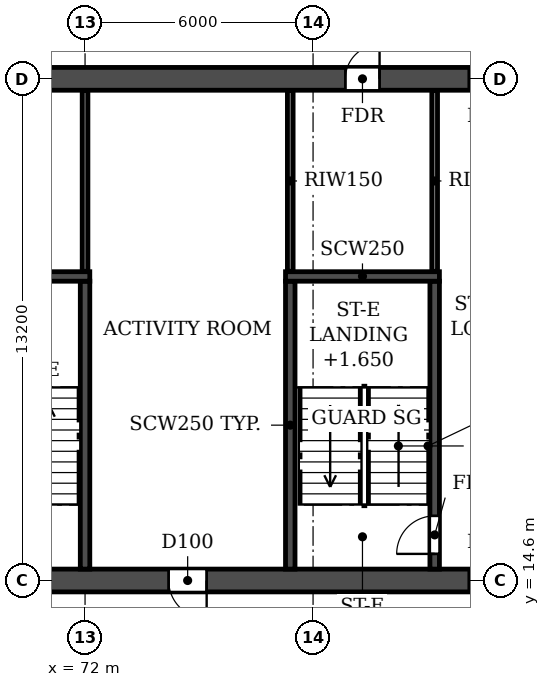
"""IFC4 building model, lengths in metres.
Left out: names, types, materials, properties, quantities, classifications, styles, units other than length and angle.
Written with IfcOpenShell. Run it as: python <this file> out.ifc"""

import sys

from ifc_helpers import new_model, si_unit, direction, frame, frame_2d, origin, place, context, subcontext, project, spatial, rectangle, extrude, element, fill, save


model = new_model("IFC4")
c1 = context("Model", 3, precision=1e-05, world=origin(), true_north=direction((0.0, 1.0)))
c2 = subcontext(c1, "Body", "Model", "MODEL_VIEW")
j1 = project(units=[si_unit("LENGTHUNIT", "METRE"), si_unit("PLANEANGLEUNIT", "RADIAN")], contexts=[c1])
p1 = place(None, origin())
s1 = spatial("IfcSite", under=j1, at=p1, CompositionType="ELEMENT")
p2 = place(p1, origin())
s2 = spatial("IfcBuilding", under=s1, at=p2, CompositionType="ELEMENT")
p3 = place(p2, frame((0.0, 0.0, 56.4)))
s3 = spatial("IfcBuildingStorey", under=s2, at=p3, CompositionType="ELEMENT", Elevation=56.4)
p4 = place(p3, frame((8.6, 14.6, 0.0), z_axis=(0.0, 0.0, 1.0), x_axis=(1.0, 0.0, 0.0)))
e1 = element("IfcWall", 1, at=p4, inside=s3, PredefinedType="SOLIDWALL", context=c2, shape_type="SweptSolid", body=[
    extrude(rectangle(XDim=84.8, YDim=0.6, at=frame_2d((42.4, 0.0))), origin(), (0.0, 0.0, 1.0), 3.05),
])
p5 = place(p4, frame((1.35, 0.0, 0.0)))
e2 = element("IfcOpeningElement", 2, at=p5, cuts=e1, PredefinedType="OPENING", context=c2, shape_type="SweptSolid", body=[
    extrude(rectangle(XDim=1.0, YDim=2.1, at=frame_2d((0.5, 1.05))), frame((0.0, 0.31, 0.0), z_axis=(0.0, -1.0, 0.0), x_axis=(1.0, 0.0, 0.0)), (0.0, 0.0, 1.0), 0.62),
])
p6 = place(p4, frame((6.05, 0.0, 0.0)))
e3 = element("IfcOpeningElement", 3, at=p6, cuts=e1, PredefinedType="OPENING", context=c2, shape_type="SweptSolid", body=[
    extrude(rectangle(XDim=1.0, YDim=2.1, at=frame_2d((0.5, 1.05))), frame((0.0, 0.31, 0.0), z_axis=(0.0, -1.0, 0.0), x_axis=(1.0, 0.0, 0.0)), (0.0, 0.0, 1.0), 0.62),
])
p7 = place(p4, frame((10.3, 0.0, 0.0)))
e4 = element("IfcOpeningElement", 4, at=p7, cuts=e1, PredefinedType="OPENING", context=c2, shape_type="SweptSolid", body=[
    extrude(rectangle(XDim=1.0, YDim=2.1, at=frame_2d((0.5, 1.05))), frame((0.0, 0.31, 0.0), z_axis=(0.0, -1.0, 0.0), x_axis=(1.0, 0.0, 0.0)), (0.0, 0.0, 1.0), 0.62),
])
p8 = place(p4, frame((18.2, 0.0, 0.0)))
e5 = element("IfcOpeningElement", 5, at=p8, cuts=e1, PredefinedType="OPENING", context=c2, shape_type="SweptSolid", body=[
    extrude(rectangle(XDim=1.0, YDim=2.1, at=frame_2d((0.5, 1.05))), frame((0.0, 0.31, 0.0), z_axis=(0.0, -1.0, 0.0), x_axis=(1.0, 0.0, 0.0)), (0.0, 0.0, 1.0), 0.62),
])
p9 = place(p4, frame((22.8, 0.0, 0.0)))
e6 = element("IfcOpeningElement", 6, at=p9, cuts=e1, PredefinedType="OPENING", context=c2, shape_type="SweptSolid", body=[
    extrude(rectangle(XDim=1.0, YDim=2.1, at=frame_2d((0.5, 1.05))), frame((0.0, 0.31, 0.0), z_axis=(0.0, -1.0, 0.0), x_axis=(1.0, 0.0, 0.0)), (0.0, 0.0, 1.0), 0.62),
])
p10 = place(p4, frame((35.4, 0.0, 0.0)))
e7 = element("IfcOpeningElement", 7, at=p10, cuts=e1, PredefinedType="OPENING", context=c2, shape_type="SweptSolid", body=[
    extrude(rectangle(XDim=1.0, YDim=2.1, at=frame_2d((0.5, 1.05))), frame((0.0, 0.31, 0.0), z_axis=(0.0, -1.0, 0.0), x_axis=(1.0, 0.0, 0.0)), (0.0, 0.0, 1.0), 0.62),
])
p11 = place(p4, frame((39.3, 0.0, 0.0)))
e8 = element("IfcOpeningElement", 8, at=p11, cuts=e1, PredefinedType="OPENING", context=c2, shape_type="SweptSolid", body=[
    extrude(rectangle(XDim=1.0, YDim=2.1, at=frame_2d((0.5, 1.05))), frame((0.0, 0.31, 0.0), z_axis=(0.0, -1.0, 0.0), x_axis=(1.0, 0.0, 0.0)), (0.0, 0.0, 1.0), 0.62),
])
p12 = place(p4, frame((41.9, 0.0, 0.0)))
e9 = element("IfcOpeningElement", 9, at=p12, cuts=e1, PredefinedType="OPENING", context=c2, shape_type="SweptSolid", body=[
    extrude(rectangle(XDim=1.0, YDim=2.1, at=frame_2d((0.5, 1.05))), frame((0.0, 0.31, 0.0), z_axis=(0.0, -1.0, 0.0), x_axis=(1.0, 0.0, 0.0)), (0.0, 0.0, 1.0), 0.62),
])
p13 = place(p4, frame((47.1, 0.0, 0.0)))
e10 = element("IfcOpeningElement", 10, at=p13, cuts=e1, PredefinedType="OPENING", context=c2, shape_type="SweptSolid", body=[
    extrude(rectangle(XDim=1.0, YDim=2.1, at=frame_2d((0.5, 1.05))), frame((0.0, 0.31, 0.0), z_axis=(0.0, -1.0, 0.0), x_axis=(1.0, 0.0, 0.0)), (0.0, 0.0, 1.0), 0.62),
])
p14 = place(p4, frame((61.0, 0.0, 0.0)))
e11 = element("IfcOpeningElement", 11, at=p14, cuts=e1, PredefinedType="OPENING", context=c2, shape_type="SweptSolid", body=[
    extrude(rectangle(XDim=1.0, YDim=2.1, at=frame_2d((0.5, 1.05))), frame((0.0, 0.31, 0.0), z_axis=(0.0, -1.0, 0.0), x_axis=(1.0, 0.0, 0.0)), (0.0, 0.0, 1.0), 0.62),
])
p15 = place(p4, frame((65.6, 0.0, 0.0)))
e12 = element("IfcOpeningElement", 12, at=p15, cuts=e1, PredefinedType="OPENING", context=c2, shape_type="SweptSolid", body=[
    extrude(rectangle(XDim=1.0, YDim=2.1, at=frame_2d((0.5, 1.05))), frame((0.0, 0.31, 0.0), z_axis=(0.0, -1.0, 0.0), x_axis=(1.0, 0.0, 0.0)), (0.0, 0.0, 1.0), 0.62),
])
p16 = place(p4, frame((73.5, 0.0, 0.0)))
e13 = element("IfcOpeningElement", 13, at=p16, cuts=e1, PredefinedType="OPENING", context=c2, shape_type="SweptSolid", body=[
    extrude(rectangle(XDim=1.0, YDim=2.1, at=frame_2d((0.5, 1.05))), frame((0.0, 0.31, 0.0), z_axis=(0.0, -1.0, 0.0), x_axis=(1.0, 0.0, 0.0)), (0.0, 0.0, 1.0), 0.62),
])
p17 = place(p4, frame((77.9, 0.0, 0.0)))
e14 = element("IfcOpeningElement", 14, at=p17, cuts=e1, PredefinedType="OPENING", context=c2, shape_type="SweptSolid", body=[
    extrude(rectangle(XDim=1.0, YDim=2.1, at=frame_2d((0.5, 1.05))), frame((0.0, 0.31, 0.0), z_axis=(0.0, -1.0, 0.0), x_axis=(1.0, 0.0, 0.0)), (0.0, 0.0, 1.0), 0.62),
])
p18 = place(p4, frame((82.6, 0.0, 0.0)))
e15 = element("IfcOpeningElement", 15, at=p18, cuts=e1, PredefinedType="OPENING", context=c2, shape_type="SweptSolid", body=[
    extrude(rectangle(XDim=1.0, YDim=2.1, at=frame_2d((0.5, 1.05))), frame((0.0, 0.31, 0.0), z_axis=(0.0, -1.0, 0.0), x_axis=(1.0, 0.0, 0.0)), (0.0, 0.0, 1.0), 0.62),
])
p19 = place(p3, frame((8.6, 27.8, 0.0), z_axis=(0.0, 0.0, 1.0), x_axis=(1.0, 0.0, 0.0)))
e16 = element("IfcWall", 16, at=p19, inside=s3, PredefinedType="SOLIDWALL", context=c2, shape_type="SweptSolid", body=[
    extrude(rectangle(XDim=84.8, YDim=0.6, at=frame_2d((42.4, 0.0))), origin(), (0.0, 0.0, 1.0), 3.05),
])
p20 = place(p19, frame((1.2, 0.0, 0.0)))
e17 = element("IfcOpeningElement", 17, at=p20, cuts=e16, PredefinedType="OPENING", context=c2, shape_type="SweptSolid", body=[
    extrude(rectangle(XDim=1.0, YDim=2.1, at=frame_2d((0.5, 1.05))), frame((0.0, 0.31, 0.0), z_axis=(0.0, -1.0, 0.0), x_axis=(1.0, 0.0, 0.0)), (0.0, 0.0, 1.0), 0.62),
])
p21 = place(p19, frame((5.9, 0.0, 0.0)))
e18 = element("IfcOpeningElement", 18, at=p21, cuts=e16, PredefinedType="OPENING", context=c2, shape_type="SweptSolid", body=[
    extrude(rectangle(XDim=1.0, YDim=2.1, at=frame_2d((0.5, 1.05))), frame((0.0, 0.31, 0.0), z_axis=(0.0, -1.0, 0.0), x_axis=(1.0, 0.0, 0.0)), (0.0, 0.0, 1.0), 0.62),
])
p22 = place(p19, frame((10.3, 0.0, 0.0)))
e19 = element("IfcOpeningElement", 19, at=p22, cuts=e16, PredefinedType="OPENING", context=c2, shape_type="SweptSolid", body=[
    extrude(rectangle(XDim=1.0, YDim=2.1, at=frame_2d((0.5, 1.05))), frame((0.0, 0.31, 0.0), z_axis=(0.0, -1.0, 0.0), x_axis=(1.0, 0.0, 0.0)), (0.0, 0.0, 1.0), 0.62),
])
p23 = place(p19, frame((13.65, 0.0, 0.0)))
e20 = element("IfcOpeningElement", 20, at=p23, cuts=e16, PredefinedType="OPENING", context=c2, shape_type="SweptSolid", body=[
    extrude(rectangle(XDim=0.9, YDim=2.1, at=frame_2d((0.45, 1.05))), frame((0.0, 0.31, 0.0), z_axis=(0.0, -1.0, 0.0), x_axis=(1.0, 0.0, 0.0)), (0.0, 0.0, 1.0), 0.62),
])
p24 = place(p19, frame((22.85, 0.0, 0.0)))
e21 = element("IfcOpeningElement", 21, at=p24, cuts=e16, PredefinedType="OPENING", context=c2, shape_type="SweptSolid", body=[
    extrude(rectangle(XDim=0.9, YDim=2.1, at=frame_2d((0.45, 1.05))), frame((0.0, 0.31, 0.0), z_axis=(0.0, -1.0, 0.0), x_axis=(1.0, 0.0, 0.0)), (0.0, 0.0, 1.0), 0.62),
])
p25 = place(p19, frame((27.3, 0.0, 0.0)))
e22 = element("IfcOpeningElement", 22, at=p25, cuts=e16, PredefinedType="OPENING", context=c2, shape_type="SweptSolid", body=[
    extrude(rectangle(XDim=1.0, YDim=2.1, at=frame_2d((0.5, 1.05))), frame((0.0, 0.31, 0.0), z_axis=(0.0, -1.0, 0.0), x_axis=(1.0, 0.0, 0.0)), (0.0, 0.0, 1.0), 0.62),
])
p26 = place(p19, frame((32.5, 0.0, 0.0)))
e23 = element("IfcOpeningElement", 23, at=p26, cuts=e16, PredefinedType="OPENING", context=c2, shape_type="SweptSolid", body=[
    extrude(rectangle(XDim=1.0, YDim=2.1, at=frame_2d((0.5, 1.05))), frame((0.0, 0.31, 0.0), z_axis=(0.0, -1.0, 0.0), x_axis=(1.0, 0.0, 0.0)), (0.0, 0.0, 1.0), 0.62),
])
p27 = place(p19, frame((39.0, 0.0, 0.0)))
e24 = element("IfcOpeningElement", 24, at=p27, cuts=e16, PredefinedType="OPENING", context=c2, shape_type="SweptSolid", body=[
    extrude(rectangle(XDim=1.0, YDim=2.1, at=frame_2d((0.5, 1.05))), frame((0.0, 0.31, 0.0), z_axis=(0.0, -1.0, 0.0), x_axis=(1.0, 0.0, 0.0)), (0.0, 0.0, 1.0), 0.62),
])
p28 = place(p19, frame((41.9, 0.0, 0.0)))
e25 = element("IfcOpeningElement", 25, at=p28, cuts=e16, PredefinedType="OPENING", context=c2, shape_type="SweptSolid", body=[
    extrude(rectangle(XDim=1.0, YDim=2.1, at=frame_2d((0.5, 1.05))), frame((0.0, 0.31, 0.0), z_axis=(0.0, -1.0, 0.0), x_axis=(1.0, 0.0, 0.0)), (0.0, 0.0, 1.0), 0.62),
])
p29 = place(p19, frame((47.4, 0.0, 0.0)))
e26 = element("IfcOpeningElement", 26, at=p29, cuts=e16, PredefinedType="OPENING", context=c2, shape_type="SweptSolid", body=[
    extrude(rectangle(XDim=1.0, YDim=2.1, at=frame_2d((0.5, 1.05))), frame((0.0, 0.31, 0.0), z_axis=(0.0, -1.0, 0.0), x_axis=(1.0, 0.0, 0.0)), (0.0, 0.0, 1.0), 0.62),
])
p30 = place(p19, frame((53.9, 0.0, 0.0)))
e27 = element("IfcOpeningElement", 27, at=p30, cuts=e16, PredefinedType="OPENING", context=c2, shape_type="SweptSolid", body=[
    extrude(rectangle(XDim=1.0, YDim=2.1, at=frame_2d((0.5, 1.05))), frame((0.0, 0.31, 0.0), z_axis=(0.0, -1.0, 0.0), x_axis=(1.0, 0.0, 0.0)), (0.0, 0.0, 1.0), 0.62),
])
p31 = place(p19, frame((57.8, 0.0, 0.0)))
e28 = element("IfcOpeningElement", 28, at=p31, cuts=e16, PredefinedType="OPENING", context=c2, shape_type="SweptSolid", body=[
    extrude(rectangle(XDim=1.0, YDim=2.1, at=frame_2d((0.5, 1.05))), frame((0.0, 0.31, 0.0), z_axis=(0.0, -1.0, 0.0), x_axis=(1.0, 0.0, 0.0)), (0.0, 0.0, 1.0), 0.62),
])
p32 = place(p19, frame((61.05, 0.0, 0.0)))
e29 = element("IfcOpeningElement", 29, at=p32, cuts=e16, PredefinedType="OPENING", context=c2, shape_type="SweptSolid", body=[
    extrude(rectangle(XDim=0.9, YDim=2.1, at=frame_2d((0.45, 1.05))), frame((0.0, 0.31, 0.0), z_axis=(0.0, -1.0, 0.0), x_axis=(1.0, 0.0, 0.0)), (0.0, 0.0, 1.0), 0.62),
])
p33 = place(p19, frame((70.25, 0.0, 0.0)))
e30 = element("IfcOpeningElement", 30, at=p33, cuts=e16, PredefinedType="OPENING", context=c2, shape_type="SweptSolid", body=[
    extrude(rectangle(XDim=0.9, YDim=2.1, at=frame_2d((0.45, 1.05))), frame((0.0, 0.31, 0.0), z_axis=(0.0, -1.0, 0.0), x_axis=(1.0, 0.0, 0.0)), (0.0, 0.0, 1.0), 0.62),
])
p34 = place(p19, frame((73.5, 0.0, 0.0)))
e31 = element("IfcOpeningElement", 31, at=p34, cuts=e16, PredefinedType="OPENING", context=c2, shape_type="SweptSolid", body=[
    extrude(rectangle(XDim=1.0, YDim=2.1, at=frame_2d((0.5, 1.05))), frame((0.0, 0.31, 0.0), z_axis=(0.0, -1.0, 0.0), x_axis=(1.0, 0.0, 0.0)), (0.0, 0.0, 1.0), 0.62),
])
p35 = place(p19, frame((77.75, 0.0, 0.0)))
e32 = element("IfcOpeningElement", 32, at=p35, cuts=e16, PredefinedType="OPENING", context=c2, shape_type="SweptSolid", body=[
    extrude(rectangle(XDim=1.0, YDim=2.1, at=frame_2d((0.5, 1.05))), frame((0.0, 0.31, 0.0), z_axis=(0.0, -1.0, 0.0), x_axis=(1.0, 0.0, 0.0)), (0.0, 0.0, 1.0), 0.62),
])
p36 = place(p19, frame((82.45, 0.0, 0.0)))
e33 = element("IfcOpeningElement", 33, at=p36, cuts=e16, PredefinedType="OPENING", context=c2, shape_type="SweptSolid", body=[
    extrude(rectangle(XDim=1.0, YDim=2.1, at=frame_2d((0.5, 1.05))), frame((0.0, 0.31, 0.0), z_axis=(0.0, -1.0, 0.0), x_axis=(1.0, 0.0, 0.0)), (0.0, 0.0, 1.0), 0.62),
])
p37 = place(p3, frame((72.0, 14.9, 0.0), z_axis=(0.0, 0.0, 1.0), x_axis=(0.0, 1.0, 0.0)))
e34 = element("IfcWall", 34, at=p37, inside=s3, PredefinedType="SOLIDWALL", context=c2, shape_type="SweptSolid", body=[
    extrude(rectangle(XDim=7.575, YDim=0.25, at=frame_2d((3.788, 0.0))), origin(), (0.0, 0.0, 1.0), 3.05),
])
p38 = place(p3, frame((68.075, 22.6, 0.0), z_axis=(0.0, 0.0, 1.0), x_axis=(1.0, 0.0, 0.0)))
e35 = element("IfcWall", 35, at=p38, inside=s3, PredefinedType="SOLIDWALL", context=c2, shape_type="SweptSolid", body=[
    extrude(rectangle(XDim=4.05, YDim=0.25, at=frame_2d((2.025, 0.0))), origin(), (0.0, 0.0, 1.0), 3.05),
])
p39 = place(p3, frame((77.4, 14.9, 0.0), z_axis=(0.0, 0.0, 1.0), x_axis=(0.0, 1.0, 0.0)))
e36 = element("IfcWall", 36, at=p39, inside=s3, PredefinedType="SOLIDWALL", context=c2, shape_type="SweptSolid", body=[
    extrude(rectangle(XDim=7.575, YDim=0.25, at=frame_2d((3.788, 0.0))), origin(), (0.0, 0.0, 1.0), 3.05),
])
p40 = place(p3, frame((81.2, 14.9, 0.0), z_axis=(0.0, 0.0, 1.0), x_axis=(0.0, 1.0, 0.0)))
e37 = element("IfcWall", 37, at=p40, inside=s3, PredefinedType="SOLIDWALL", context=c2, shape_type="SweptSolid", body=[
    extrude(rectangle(XDim=7.575, YDim=0.25, at=frame_2d((3.788, 0.0))), origin(), (0.0, 0.0, 1.0), 3.05),
])
p41 = place(p40, frame((0.4, 0.0, 0.0)))
e38 = element("IfcOpeningElement", 38, at=p41, cuts=e37, PredefinedType="OPENING", context=c2, shape_type="SweptSolid", body=[
    extrude(rectangle(XDim=1.0, YDim=2.1, at=frame_2d((0.5, 1.05))), frame((0.0, 0.135, 0.0), z_axis=(0.0, -1.0, 0.0), x_axis=(1.0, 0.0, 0.0)), (0.0, 0.0, 1.0), 0.27),
])
p42 = place(p3, frame((77.275, 22.6, 0.0), z_axis=(0.0, 0.0, 1.0), x_axis=(1.0, 0.0, 0.0)))
e39 = element("IfcWall", 39, at=p42, inside=s3, PredefinedType="SOLIDWALL", context=c2, shape_type="SweptSolid", body=[
    extrude(rectangle(XDim=4.05, YDim=0.25, at=frame_2d((2.025, 0.0))), origin(), (0.0, 0.0, 1.0), 3.05),
])
for number, where, z_axis, x_axis in (
    (40, (72.0, 22.735, 0.0), (0.0, 0.0, 1.0), (0.0, 1.0, 0.0)),
    (41, (77.4, 22.735, 0.0), (0.0, 0.0, 1.0), (0.0, 1.0, 0.0)),
    (42, (81.2, 22.735, 0.0), (0.0, 0.0, 1.0), (0.0, 1.0, 0.0)),
):
    element("IfcWall", number, at=place(p3, frame(where, z_axis=z_axis, x_axis=x_axis)), inside=s3, PredefinedType="PARTITIONING", context=c2, shape_type="SweptSolid", body=[
        extrude(rectangle(XDim=4.755, YDim=0.15, at=frame_2d((2.377, 0.0))), origin(), (0.0, 0.0, 1.0), 3.05),
    ])
p43 = place(p33, origin())
e43 = element("IfcDoor", 43, at=p43, inside=s3, OperationType="SINGLE_SWING_RIGHT", PredefinedType="DOOR", context=c2, shape_type="SweptSolid", body=[
    extrude(rectangle(XDim=0.9, YDim=2.1, at=frame_2d((0.45, 1.05))), frame((0.0, 0.025, 0.0), z_axis=(0.0, -1.0, 0.0), x_axis=(1.0, 0.0, 0.0)), (0.0, 0.0, 1.0), 0.05),
])
fill(e30, e43)
p44 = place(p34, origin())
e44 = element("IfcDoor", 44, at=p44, inside=s3, OperationType="SINGLE_SWING_RIGHT", PredefinedType="DOOR", context=c2, shape_type="SweptSolid", body=[
    extrude(rectangle(XDim=1.0, YDim=2.1, at=frame_2d((0.5, 1.05))), frame((0.0, 0.025, 0.0), z_axis=(0.0, -1.0, 0.0), x_axis=(1.0, 0.0, 0.0)), (0.0, 0.0, 1.0), 0.05),
])
fill(e31, e44)
p45 = place(p15, frame((1.0, 0.0, 0.0), z_axis=(0.0, 0.0, 1.0), x_axis=(-1.0, 0.0, 0.0)))
e45 = element("IfcDoor", 45, at=p45, inside=s3, OperationType="SINGLE_SWING_LEFT", PredefinedType="DOOR", context=c2, shape_type="SweptSolid", body=[
    extrude(rectangle(XDim=1.0, YDim=2.1, at=frame_2d((0.5, 1.05))), frame((0.0, 0.025, 0.0), z_axis=(0.0, -1.0, 0.0), x_axis=(1.0, 0.0, 0.0)), (0.0, 0.0, 1.0), 0.05),
])
fill(e12, e45)
p46 = place(p16, frame((1.0, 0.0, 0.0), z_axis=(0.0, 0.0, 1.0), x_axis=(-1.0, 0.0, 0.0)))
e46 = element("IfcDoor", 46, at=p46, inside=s3, OperationType="SINGLE_SWING_LEFT", PredefinedType="DOOR", context=c2, shape_type="SweptSolid", body=[
    extrude(rectangle(XDim=1.0, YDim=2.1, at=frame_2d((0.5, 1.05))), frame((0.0, 0.025, 0.0), z_axis=(0.0, -1.0, 0.0), x_axis=(1.0, 0.0, 0.0)), (0.0, 0.0, 1.0), 0.05),
])
fill(e13, e46)
p47 = place(p41, origin())
e47 = element("IfcDoor", 47, at=p47, inside=s3, OperationType="SINGLE_SWING_LEFT", PredefinedType="DOOR", context=c2, shape_type="SweptSolid", body=[
    extrude(rectangle(XDim=1.0, YDim=2.1, at=frame_2d((0.5, 1.05))), frame((0.0, 0.025, 0.0), z_axis=(0.0, -1.0, 0.0), x_axis=(1.0, 0.0, 0.0)), (0.0, 0.0, 1.0), 0.05),
])
fill(e38, e47)
save(model, sys.argv[1])
